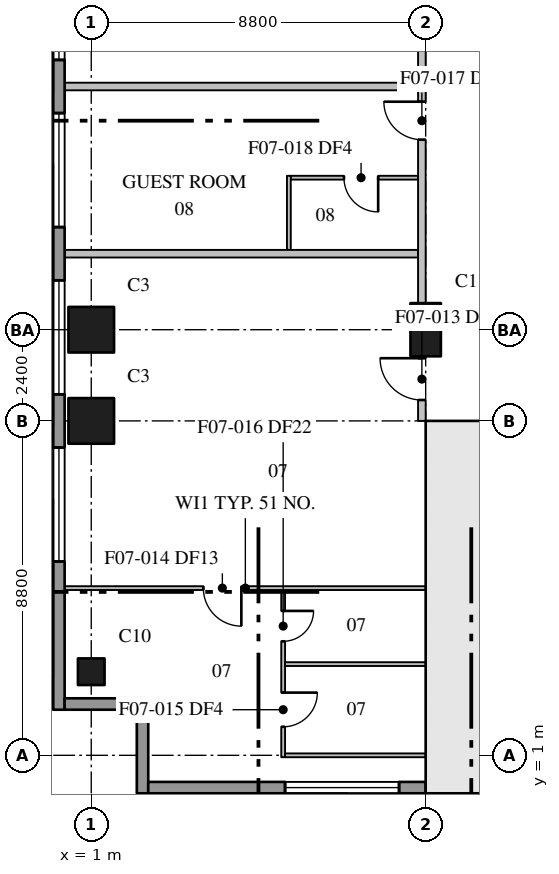
"""IFC4 building model, lengths in metres.
Left out: names, types, materials, properties, quantities, classifications, styles, units other than length and angle.
Written with IfcOpenShell. Run it as: python <this file> out.ifc"""

import sys

from ifc_helpers import new_model, si_unit, direction, frame, frame_2d, origin, origin_2d, place, context, subcontext, project, spatial, rectangle, extrude, element, fill, save


model = new_model("IFC4")
c1 = context("Model", 3, precision=1e-05, world=origin(), true_north=direction((0.0, 1.0)))
c2 = subcontext(c1, "Body", "Model", "MODEL_VIEW")
j1 = project(units=[si_unit("LENGTHUNIT", "METRE"), si_unit("PLANEANGLEUNIT", "RADIAN")], contexts=[c1])
p1 = place(None, origin())
s1 = spatial("IfcSite", under=j1, at=p1, CompositionType="ELEMENT")
p2 = place(p1, origin())
s2 = spatial("IfcBuilding", under=s1, at=p2, CompositionType="ELEMENT")
p3 = place(p2, frame((0.0, 0.0, 83.4)))
s3 = spatial("IfcBuildingStorey", under=s2, at=p3, CompositionType="ELEMENT", Elevation=83.4)
p4 = place(p3, frame((1.0, 3.2, 0.0), z_axis=(0.0, 0.0, 1.0), x_axis=(1.0, 0.0, 0.0)))
e1 = element("IfcColumn", 1, at=p4, inside=s3, PredefinedType="COLUMN", context=c2, shape_type="SweptSolid", body=[
    extrude(rectangle(XDim=0.7, YDim=0.7, at=origin_2d()), origin(), (0.0, 0.0, 1.0), 3.7),
])
for number, where, z_axis, x_axis in (
    (2, (1.0, 9.8, 0.0), (0.0, 0.0, 1.0), (1.0, 0.0, 0.0)),
    (3, (1.0, 12.2, 0.0), (0.0, 0.0, 1.0), (1.0, 0.0, 0.0)),
):
    element("IfcColumn", number, at=place(p3, frame(where, z_axis=z_axis, x_axis=x_axis)), inside=s3, PredefinedType="COLUMN", context=c2, shape_type="SweptSolid", body=[
        extrude(rectangle(XDim=1.2, YDim=1.2, at=origin_2d()), origin(), (0.0, 0.0, 1.0), 3.7),
    ])
p5 = place(p3, frame((9.8, 12.2, 0.0), z_axis=(0.0, 0.0, 1.0), x_axis=(0.0, 1.0, 0.0)))
e4 = element("IfcColumn", 4, at=p5, inside=s3, PredefinedType="COLUMN", context=c2, shape_type="SweptSolid", body=[
    extrude(rectangle(XDim=1.4, YDim=0.8, at=origin_2d()), origin(), (0.0, 0.0, 1.0), 3.7),
])
p6 = place(p3, frame((9.8, 0.8, 0.0), z_axis=(0.0, 0.0, 1.0), x_axis=(1.0, 0.0, 0.0)))
e5 = element("IfcWall", 5, at=p6, inside=s3, PredefinedType="SHEAR", context=c2, shape_type="SweptSolid", body=[
    extrude(rectangle(XDim=35.2, YDim=0.8, at=frame_2d((17.6, 0.0))), origin(), (0.0, 0.0, 1.0), 3.7),
])
p7 = place(p3, frame((10.6, 1.2, 0.0), z_axis=(0.0, 0.0, 1.0), x_axis=(0.0, 1.0, 0.0)))
e6 = element("IfcWall", 6, at=p7, inside=s3, PredefinedType="SHEAR", context=c2, shape_type="SweptSolid", body=[
    extrude(rectangle(XDim=8.6, YDim=0.8, at=frame_2d((4.3, 0.0))), origin(), (0.0, 0.0, 1.0), 3.7),
])
p8 = place(p3, frame((9.8, 9.6, 0.0), z_axis=(0.0, 0.0, 1.0), x_axis=(1.0, 0.0, 0.0)))
e7 = element("IfcWall", 7, at=p8, inside=s3, PredefinedType="SHEAR", context=c2, shape_type="SweptSolid", body=[
    extrude(rectangle(XDim=4.3, YDim=0.4, at=frame_2d((2.15, 0.0))), origin(), (0.0, 0.0, 1.0), 3.7),
])
p9 = place(p8, frame((2.05, 0.0, 0.0)))
e8 = element("IfcOpeningElement", 8, at=p9, cuts=e7, PredefinedType="OPENING", context=c2, shape_type="SweptSolid", body=[
    extrude(rectangle(XDim=1.2, YDim=2.1, at=frame_2d((0.6, 1.05))), frame((0.0, 0.21, 0.0), z_axis=(0.0, -1.0, 0.0), x_axis=(1.0, 0.0, 0.0)), (0.0, 0.0, 1.0), 0.42),
])
p10 = place(p3, frame((0.15, 78.7, 0.0), z_axis=(0.0, 0.0, 1.0), x_axis=(0.0, -1.0, 0.0)))
e9 = element("IfcWall", 9, at=p10, inside=s3, PredefinedType="STANDARD", context=c2, shape_type="SweptSolid", body=[
    extrude(rectangle(XDim=76.5, YDim=0.3, at=frame_2d((38.25, 0.0))), origin(), (0.0, 0.0, 1.0), 3.4),
])
p11 = place(p10, frame((3.6, 0.0, 0.75)))
e10 = element("IfcOpeningElement", 10, at=p11, cuts=e9, PredefinedType="OPENING", context=c2, shape_type="SweptSolid", body=[
    extrude(rectangle(XDim=3.0, YDim=2.3, at=frame_2d((1.5, 1.15))), frame((0.0, 0.16, 0.0), z_axis=(0.0, -1.0, 0.0), x_axis=(1.0, 0.0, 0.0)), (0.0, 0.0, 1.0), 0.32),
])
p12 = place(p10, frame((8.0, 0.0, 0.75)))
e11 = element("IfcOpeningElement", 11, at=p12, cuts=e9, PredefinedType="OPENING", context=c2, shape_type="SweptSolid", body=[
    extrude(rectangle(XDim=3.0, YDim=2.3, at=frame_2d((1.5, 1.15))), frame((0.0, 0.16, 0.0), z_axis=(0.0, -1.0, 0.0), x_axis=(1.0, 0.0, 0.0)), (0.0, 0.0, 1.0), 0.32),
])
p13 = place(p10, frame((12.4, 0.0, 0.75)))
e12 = element("IfcOpeningElement", 12, at=p13, cuts=e9, PredefinedType="OPENING", context=c2, shape_type="SweptSolid", body=[
    extrude(rectangle(XDim=3.0, YDim=2.3, at=frame_2d((1.5, 1.15))), frame((0.0, 0.16, 0.0), z_axis=(0.0, -1.0, 0.0), x_axis=(1.0, 0.0, 0.0)), (0.0, 0.0, 1.0), 0.32),
])
p14 = place(p10, frame((16.8, 0.0, 0.75)))
e13 = element("IfcOpeningElement", 13, at=p14, cuts=e9, PredefinedType="OPENING", context=c2, shape_type="SweptSolid", body=[
    extrude(rectangle(XDim=3.0, YDim=2.3, at=frame_2d((1.5, 1.15))), frame((0.0, 0.16, 0.0), z_axis=(0.0, -1.0, 0.0), x_axis=(1.0, 0.0, 0.0)), (0.0, 0.0, 1.0), 0.32),
])
p15 = place(p10, frame((21.2, 0.0, 0.75)))
e14 = element("IfcOpeningElement", 14, at=p15, cuts=e9, PredefinedType="OPENING", context=c2, shape_type="SweptSolid", body=[
    extrude(rectangle(XDim=3.0, YDim=2.3, at=frame_2d((1.5, 1.15))), frame((0.0, 0.16, 0.0), z_axis=(0.0, -1.0, 0.0), x_axis=(1.0, 0.0, 0.0)), (0.0, 0.0, 1.0), 0.32),
])
p16 = place(p10, frame((25.6, 0.0, 0.75)))
e15 = element("IfcOpeningElement", 15, at=p16, cuts=e9, PredefinedType="OPENING", context=c2, shape_type="SweptSolid", body=[
    extrude(rectangle(XDim=3.0, YDim=2.3, at=frame_2d((1.5, 1.15))), frame((0.0, 0.16, 0.0), z_axis=(0.0, -1.0, 0.0), x_axis=(1.0, 0.0, 0.0)), (0.0, 0.0, 1.0), 0.32),
])
p17 = place(p10, frame((30.0, 0.0, 0.75)))
e16 = element("IfcOpeningElement", 16, at=p17, cuts=e9, PredefinedType="OPENING", context=c2, shape_type="SweptSolid", body=[
    extrude(rectangle(XDim=3.0, YDim=2.3, at=frame_2d((1.5, 1.15))), frame((0.0, 0.16, 0.0), z_axis=(0.0, -1.0, 0.0), x_axis=(1.0, 0.0, 0.0)), (0.0, 0.0, 1.0), 0.32),
])
p18 = place(p10, frame((34.4, 0.0, 0.75)))
e17 = element("IfcOpeningElement", 17, at=p18, cuts=e9, PredefinedType="OPENING", context=c2, shape_type="SweptSolid", body=[
    extrude(rectangle(XDim=3.0, YDim=2.3, at=frame_2d((1.5, 1.15))), frame((0.0, 0.16, 0.0), z_axis=(0.0, -1.0, 0.0), x_axis=(1.0, 0.0, 0.0)), (0.0, 0.0, 1.0), 0.32),
])
p19 = place(p10, frame((38.8, 0.0, 0.75)))
e18 = element("IfcOpeningElement", 18, at=p19, cuts=e9, PredefinedType="OPENING", context=c2, shape_type="SweptSolid", body=[
    extrude(rectangle(XDim=3.0, YDim=2.3, at=frame_2d((1.5, 1.15))), frame((0.0, 0.16, 0.0), z_axis=(0.0, -1.0, 0.0), x_axis=(1.0, 0.0, 0.0)), (0.0, 0.0, 1.0), 0.32),
])
p20 = place(p10, frame((43.2, 0.0, 0.75)))
e19 = element("IfcOpeningElement", 19, at=p20, cuts=e9, PredefinedType="OPENING", context=c2, shape_type="SweptSolid", body=[
    extrude(rectangle(XDim=3.0, YDim=2.3, at=frame_2d((1.5, 1.15))), frame((0.0, 0.16, 0.0), z_axis=(0.0, -1.0, 0.0), x_axis=(1.0, 0.0, 0.0)), (0.0, 0.0, 1.0), 0.32),
])
p21 = place(p10, frame((47.6, 0.0, 0.75)))
e20 = element("IfcOpeningElement", 20, at=p21, cuts=e9, PredefinedType="OPENING", context=c2, shape_type="SweptSolid", body=[
    extrude(rectangle(XDim=3.0, YDim=2.3, at=frame_2d((1.5, 1.15))), frame((0.0, 0.16, 0.0), z_axis=(0.0, -1.0, 0.0), x_axis=(1.0, 0.0, 0.0)), (0.0, 0.0, 1.0), 0.32),
])
p22 = place(p10, frame((52.0, 0.0, 0.75)))
e21 = element("IfcOpeningElement", 21, at=p22, cuts=e9, PredefinedType="OPENING", context=c2, shape_type="SweptSolid", body=[
    extrude(rectangle(XDim=3.0, YDim=2.3, at=frame_2d((1.5, 1.15))), frame((0.0, 0.16, 0.0), z_axis=(0.0, -1.0, 0.0), x_axis=(1.0, 0.0, 0.0)), (0.0, 0.0, 1.0), 0.32),
])
p23 = place(p10, frame((56.4, 0.0, 0.75)))
e22 = element("IfcOpeningElement", 22, at=p23, cuts=e9, PredefinedType="OPENING", context=c2, shape_type="SweptSolid", body=[
    extrude(rectangle(XDim=3.0, YDim=2.3, at=frame_2d((1.5, 1.15))), frame((0.0, 0.16, 0.0), z_axis=(0.0, -1.0, 0.0), x_axis=(1.0, 0.0, 0.0)), (0.0, 0.0, 1.0), 0.32),
])
p24 = place(p10, frame((60.8, 0.0, 0.75)))
e23 = element("IfcOpeningElement", 23, at=p24, cuts=e9, PredefinedType="OPENING", context=c2, shape_type="SweptSolid", body=[
    extrude(rectangle(XDim=3.0, YDim=2.3, at=frame_2d((1.5, 1.15))), frame((0.0, 0.16, 0.0), z_axis=(0.0, -1.0, 0.0), x_axis=(1.0, 0.0, 0.0)), (0.0, 0.0, 1.0), 0.32),
])
p25 = place(p10, frame((65.2, 0.0, 0.75)))
e24 = element("IfcOpeningElement", 24, at=p25, cuts=e9, PredefinedType="OPENING", context=c2, shape_type="SweptSolid", body=[
    extrude(rectangle(XDim=3.0, YDim=2.3, at=frame_2d((1.5, 1.15))), frame((0.0, 0.16, 0.0), z_axis=(0.0, -1.0, 0.0), x_axis=(1.0, 0.0, 0.0)), (0.0, 0.0, 1.0), 0.32),
])
p26 = place(p10, frame((69.6, 0.0, 0.75)))
e25 = element("IfcOpeningElement", 25, at=p26, cuts=e9, PredefinedType="OPENING", context=c2, shape_type="SweptSolid", body=[
    extrude(rectangle(XDim=3.0, YDim=2.3, at=frame_2d((1.5, 1.15))), frame((0.0, 0.16, 0.0), z_axis=(0.0, -1.0, 0.0), x_axis=(1.0, 0.0, 0.0)), (0.0, 0.0, 1.0), 0.32),
])
for number, where, z_axis, x_axis in (
    (26, (0.3, 2.35, 0.0), (0.0, 0.0, 1.0), (1.0, 0.0, 0.0)),
    (27, (2.35, 2.2, 0.0), (0.0, 0.0, 1.0), (0.0, -1.0, 0.0)),
):
    element("IfcWall", number, at=place(p3, frame(where, z_axis=z_axis, x_axis=x_axis)), inside=s3, PredefinedType="STANDARD", context=c2, shape_type="SweptSolid", body=[
        extrude(rectangle(XDim=2.2, YDim=0.3, at=frame_2d((1.1, 0.0))), origin(), (0.0, 0.0, 1.0), 3.4),
    ])
p27 = place(p3, frame((2.5, 0.15, 0.0), z_axis=(0.0, 0.0, 1.0), x_axis=(1.0, 0.0, 0.0)))
e28 = element("IfcWall", 28, at=p27, inside=s3, PredefinedType="STANDARD", context=c2, shape_type="SweptSolid", body=[
    extrude(rectangle(XDim=7.3, YDim=0.3, at=frame_2d((3.65, 0.0))), origin(), (0.0, 0.0, 1.0), 3.4),
])
p28 = place(p27, frame((3.6, 0.0, 0.75)))
e29 = element("IfcOpeningElement", 29, at=p28, cuts=e28, PredefinedType="OPENING", context=c2, shape_type="SweptSolid", body=[
    extrude(rectangle(XDim=3.0, YDim=2.3, at=frame_2d((1.5, 1.15))), frame((0.0, 0.16, 0.0), z_axis=(0.0, -1.0, 0.0), x_axis=(1.0, 0.0, 0.0)), (0.0, 0.0, 1.0), 0.32),
])
p29 = place(p3, frame((9.7, 9.8, 0.0), z_axis=(0.0, 0.0, 1.0), x_axis=(0.0, 1.0, 0.0)))
e30 = element("IfcWall", 30, at=p29, inside=s3, PredefinedType="PARTITIONING", context=c2, shape_type="SweptSolid", body=[
    extrude(rectangle(XDim=1.7, YDim=0.2, at=frame_2d((0.85, 0.0))), origin(), (0.0, 0.0, 1.0), 3.4),
])
p30 = place(p29, frame((0.55, 0.0, 0.0)))
e31 = element("IfcOpeningElement", 31, at=p30, cuts=e30, PredefinedType="OPENING", context=c2, shape_type="SweptSolid", body=[
    extrude(rectangle(XDim=1.1, YDim=2.1, at=frame_2d((0.55, 1.05))), frame((0.0, 0.11, 0.0), z_axis=(0.0, -1.0, 0.0), x_axis=(1.0, 0.0, 0.0)), (0.0, 0.0, 1.0), 0.22),
])
p31 = place(p3, frame((9.7, 12.9, 0.0), z_axis=(0.0, 0.0, 1.0), x_axis=(0.0, 1.0, 0.0)))
e32 = element("IfcWall", 32, at=p31, inside=s3, PredefinedType="PARTITIONING", context=c2, shape_type="SweptSolid", body=[
    extrude(rectangle(XDim=7.5, YDim=0.2, at=frame_2d((3.75, 0.0))), origin(), (0.0, 0.0, 1.0), 3.4),
])
p32 = place(p31, frame((4.3, 0.0, 0.0)))
e33 = element("IfcOpeningElement", 33, at=p32, cuts=e32, PredefinedType="OPENING", context=c2, shape_type="SweptSolid", body=[
    extrude(rectangle(XDim=1.0, YDim=2.1, at=frame_2d((0.5, 1.05))), frame((0.0, 0.11, 0.0), z_axis=(0.0, -1.0, 0.0), x_axis=(1.0, 0.0, 0.0)), (0.0, 0.0, 1.0), 0.22),
])
for number, where, z_axis, x_axis in (
    (34, (0.31, 14.2, 0.0), (0.0, 0.0, 1.0), (1.0, 0.0, 0.0)),
    (35, (0.31, 18.6, 0.0), (0.0, 0.0, 1.0), (1.0, 0.0, 0.0)),
):
    element("IfcWall", number, at=place(p3, frame(where, z_axis=z_axis, x_axis=x_axis)), inside=s3, PredefinedType="PARTITIONING", context=c2, shape_type="SweptSolid", body=[
        extrude(rectangle(XDim=9.29, YDim=0.2, at=frame_2d((4.645, 0.0))), origin(), (0.0, 0.0, 1.0), 3.4),
    ])
p33 = place(p3, frame((9.6, 16.2, 0.0), z_axis=(0.0, 0.0, 1.0), x_axis=(-1.0, 0.0, 0.0)))
e36 = element("IfcWall", 36, at=p33, inside=s3, PredefinedType="PARTITIONING", context=c2, shape_type="SweptSolid", body=[
    extrude(rectangle(XDim=3.35, YDim=0.1, at=frame_2d((1.675, 0.0))), origin(), (0.0, 0.0, 1.0), 3.4),
])
p34 = place(p33, frame((1.05, 0.0, 0.0)))
e37 = element("IfcOpeningElement", 37, at=p34, cuts=e36, PredefinedType="OPENING", context=c2, shape_type="SweptSolid", body=[
    extrude(rectangle(XDim=0.9, YDim=2.1, at=frame_2d((0.45, 1.05))), frame((0.0, 0.06, 0.0), z_axis=(0.0, -1.0, 0.0), x_axis=(1.0, 0.0, 0.0)), (0.0, 0.0, 1.0), 0.12),
])
p35 = place(p3, frame((6.05, 5.35, 0.0), z_axis=(0.0, 0.0, 1.0), x_axis=(0.0, -1.0, 0.0)))
e38 = element("IfcWall", 38, at=p35, inside=s3, PredefinedType="PARTITIONING", context=c2, shape_type="SweptSolid", body=[
    extrude(rectangle(XDim=4.4, YDim=0.1, at=frame_2d((2.2, 0.0))), origin(), (0.0, 0.0, 1.0), 3.4),
])
p36 = place(p35, frame((2.7, 0.0, 0.0)))
e39 = element("IfcOpeningElement", 39, at=p36, cuts=e38, PredefinedType="OPENING", context=c2, shape_type="SweptSolid", body=[
    extrude(rectangle(XDim=0.9, YDim=2.1, at=frame_2d((0.45, 1.05))), frame((0.0, 0.06, 0.0), z_axis=(0.0, -1.0, 0.0), x_axis=(1.0, 0.0, 0.0)), (0.0, 0.0, 1.0), 0.12),
])
p37 = place(p35, frame((0.55, 0.0, 0.0)))
e40 = element("IfcOpeningElement", 40, at=p37, cuts=e38, PredefinedType="OPENING", context=c2, shape_type="SweptSolid", body=[
    extrude(rectangle(XDim=0.8, YDim=2.1, at=frame_2d((0.4, 1.05))), frame((0.0, 0.06, 0.0), z_axis=(0.0, -1.0, 0.0), x_axis=(1.0, 0.0, 0.0)), (0.0, 0.0, 1.0), 0.12),
])
p38 = place(p3, frame((9.8, 5.4, 0.0), z_axis=(0.0, 0.0, 1.0), x_axis=(-1.0, 0.0, 0.0)))
e41 = element("IfcWall", 41, at=p38, inside=s3, PredefinedType="PARTITIONING", context=c2, shape_type="SweptSolid", body=[
    extrude(rectangle(XDim=9.49, YDim=0.1, at=frame_2d((4.745, 0.0))), origin(), (0.0, 0.0, 1.0), 3.4),
])
p39 = place(p38, frame((4.85, 0.0, 0.0)))
e42 = element("IfcOpeningElement", 42, at=p39, cuts=e41, PredefinedType="OPENING", context=c2, shape_type="SweptSolid", body=[
    extrude(rectangle(XDim=1.0, YDim=2.1, at=frame_2d((0.5, 1.05))), frame((0.0, 0.06, 0.0), z_axis=(0.0, -1.0, 0.0), x_axis=(1.0, 0.0, 0.0)), (0.0, 0.0, 1.0), 0.12),
])
for number, where, z_axis, x_axis in (
    (43, (6.1, 1.0, 0.0), (0.0, 0.0, 1.0), (1.0, 0.0, 0.0)),
    (44, (6.1, 3.4, 0.0), (0.0, 0.0, 1.0), (1.0, 0.0, 0.0)),
):
    element("IfcWall", number, at=place(p3, frame(where, z_axis=z_axis, x_axis=x_axis)), inside=s3, PredefinedType="PARTITIONING", context=c2, shape_type="SweptSolid", body=[
        extrude(rectangle(XDim=3.7, YDim=0.1, at=frame_2d((1.85, 0.0))), origin(), (0.0, 0.0, 1.0), 3.4),
    ])
p40 = place(p3, frame((6.2, 14.3, 0.0), z_axis=(0.0, 0.0, 1.0), x_axis=(0.0, 1.0, 0.0)))
e45 = element("IfcWall", 45, at=p40, inside=s3, PredefinedType="PARTITIONING", context=c2, shape_type="SweptSolid", body=[
    extrude(rectangle(XDim=1.95, YDim=0.1, at=frame_2d((0.975, 0.0))), origin(), (0.0, 0.0, 1.0), 3.4),
])
p41 = place(p23, origin())
e46 = element("IfcWindow", 46, at=p41, inside=s3, PartitioningType="SINGLE_PANEL", PredefinedType="WINDOW", context=c2, shape_type="SweptSolid", body=[
    extrude(rectangle(XDim=3.0, YDim=2.3, at=frame_2d((1.5, 1.15))), frame((0.0, 0.03, 0.0), z_axis=(0.0, -1.0, 0.0), x_axis=(1.0, 0.0, 0.0)), (0.0, 0.0, 1.0), 0.06),
])
fill(e22, e46)
p42 = place(p24, origin())
e47 = element("IfcWindow", 47, at=p42, inside=s3, PartitioningType="SINGLE_PANEL", PredefinedType="WINDOW", context=c2, shape_type="SweptSolid", body=[
    extrude(rectangle(XDim=3.0, YDim=2.3, at=frame_2d((1.5, 1.15))), frame((0.0, 0.03, 0.0), z_axis=(0.0, -1.0, 0.0), x_axis=(1.0, 0.0, 0.0)), (0.0, 0.0, 1.0), 0.06),
])
fill(e23, e47)
p43 = place(p25, origin())
e48 = element("IfcWindow", 48, at=p43, inside=s3, PartitioningType="SINGLE_PANEL", PredefinedType="WINDOW", context=c2, shape_type="SweptSolid", body=[
    extrude(rectangle(XDim=3.0, YDim=2.3, at=frame_2d((1.5, 1.15))), frame((0.0, 0.03, 0.0), z_axis=(0.0, -1.0, 0.0), x_axis=(1.0, 0.0, 0.0)), (0.0, 0.0, 1.0), 0.06),
])
fill(e24, e48)
p44 = place(p26, origin())
e49 = element("IfcWindow", 49, at=p44, inside=s3, PartitioningType="SINGLE_PANEL", PredefinedType="WINDOW", context=c2, shape_type="SweptSolid", body=[
    extrude(rectangle(XDim=3.0, YDim=2.3, at=frame_2d((1.5, 1.15))), frame((0.0, 0.03, 0.0), z_axis=(0.0, -1.0, 0.0), x_axis=(1.0, 0.0, 0.0)), (0.0, 0.0, 1.0), 0.06),
])
fill(e25, e49)
p45 = place(p28, origin())
e50 = element("IfcWindow", 50, at=p45, inside=s3, PartitioningType="SINGLE_PANEL", PredefinedType="WINDOW", context=c2, shape_type="SweptSolid", body=[
    extrude(rectangle(XDim=3.0, YDim=2.3, at=frame_2d((1.5, 1.15))), frame((0.0, 0.03, 0.0), z_axis=(0.0, -1.0, 0.0), x_axis=(1.0, 0.0, 0.0)), (0.0, 0.0, 1.0), 0.06),
])
fill(e29, e50)
p46 = place(p30, origin())
e51 = element("IfcDoor", 51, at=p46, inside=s3, OperationType="SINGLE_SWING_RIGHT", PredefinedType="DOOR", context=c2, shape_type="SweptSolid", body=[
    extrude(rectangle(XDim=1.1, YDim=2.1, at=frame_2d((0.55, 1.05))), frame((0.0, 0.025, 0.0), z_axis=(0.0, -1.0, 0.0), x_axis=(1.0, 0.0, 0.0)), (0.0, 0.0, 1.0), 0.05),
])
fill(e31, e51)
p47 = place(p39, origin())
e52 = element("IfcDoor", 52, at=p47, inside=s3, OperationType="SINGLE_SWING_LEFT", PredefinedType="DOOR", context=c2, shape_type="SweptSolid", body=[
    extrude(rectangle(XDim=1.0, YDim=2.1, at=frame_2d((0.5, 1.05))), frame((0.0, 0.025, 0.0), z_axis=(0.0, -1.0, 0.0), x_axis=(1.0, 0.0, 0.0)), (0.0, 0.0, 1.0), 0.05),
])
fill(e42, e52)
p48 = place(p36, origin())
e53 = element("IfcDoor", 53, at=p48, inside=s3, OperationType="SINGLE_SWING_LEFT", PredefinedType="DOOR", context=c2, shape_type="SweptSolid", body=[
    extrude(rectangle(XDim=0.9, YDim=2.1, at=frame_2d((0.45, 1.05))), frame((0.0, 0.025, 0.0), z_axis=(0.0, -1.0, 0.0), x_axis=(1.0, 0.0, 0.0)), (0.0, 0.0, 1.0), 0.05),
])
fill(e39, e53)
p49 = place(p37, origin())
e54 = element("IfcDoor", 54, at=p49, inside=s3, OperationType="SINGLE_SWING_LEFT", PredefinedType="DOOR", context=c2, shape_type="SweptSolid", body=[
    extrude(rectangle(XDim=0.8, YDim=2.1, at=frame_2d((0.4, 1.05))), frame((0.0, 0.025, 0.0), z_axis=(0.0, -1.0, 0.0), x_axis=(1.0, 0.0, 0.0)), (0.0, 0.0, 1.0), 0.05),
])
fill(e40, e54)
p50 = place(p32, origin())
e55 = element("IfcDoor", 55, at=p50, inside=s3, OperationType="SINGLE_SWING_RIGHT", PredefinedType="DOOR", context=c2, shape_type="SweptSolid", body=[
    extrude(rectangle(XDim=1.0, YDim=2.1, at=frame_2d((0.5, 1.05))), frame((0.0, 0.025, 0.0), z_axis=(0.0, -1.0, 0.0), x_axis=(1.0, 0.0, 0.0)), (0.0, 0.0, 1.0), 0.05),
])
fill(e33, e55)
p51 = place(p34, origin())
e56 = element("IfcDoor", 56, at=p51, inside=s3, OperationType="SINGLE_SWING_LEFT", PredefinedType="DOOR", context=c2, shape_type="SweptSolid", body=[
    extrude(rectangle(XDim=0.9, YDim=2.1, at=frame_2d((0.45, 1.05))), frame((0.0, 0.025, 0.0), z_axis=(0.0, -1.0, 0.0), x_axis=(1.0, 0.0, 0.0)), (0.0, 0.0, 1.0), 0.05),
])
fill(e37, e56)
save(model, sys.argv[1])
